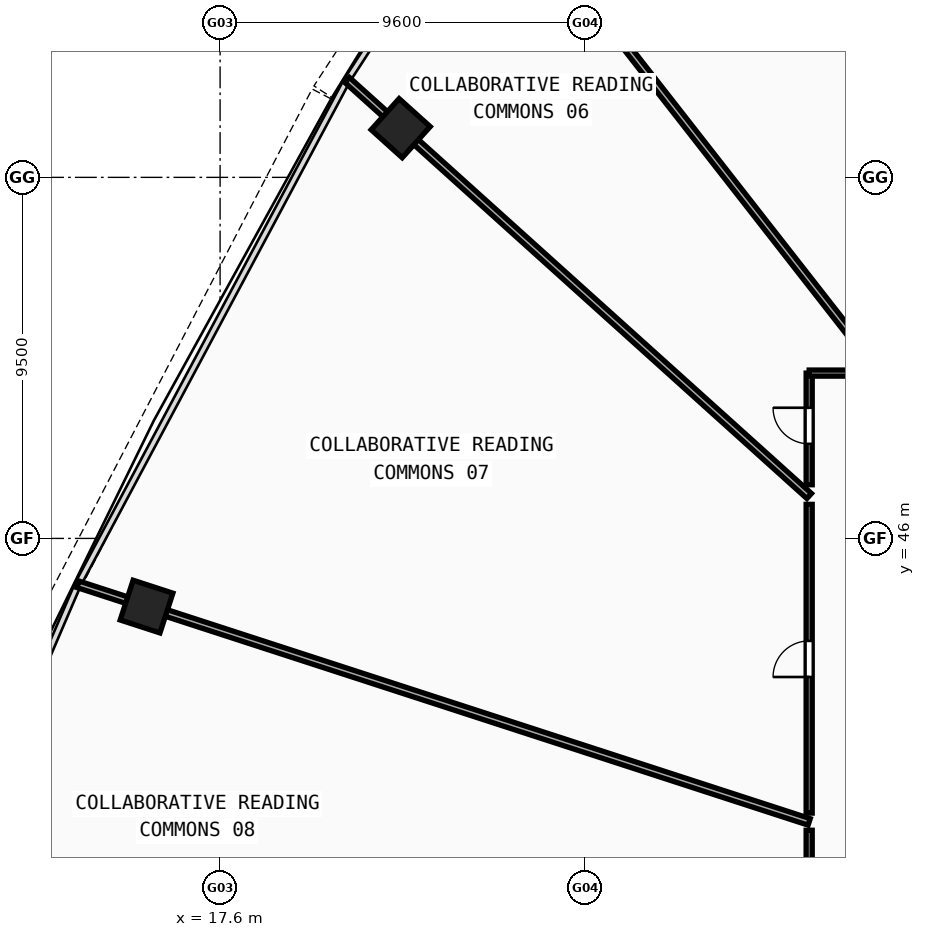
"""IFC4 building model, lengths in metres.
Left out: names, types, materials, properties, quantities, classifications, styles, units other than length and angle.
Written with IfcOpenShell. Run it as: python <this file> out.ifc"""

import sys

from ifc_helpers import new_model, si_unit, direction, frame, frame_2d, origin, origin_with_axes, origin_2d, place, context, subcontext, project, spatial, rectangle, hollow_rectangle, extrude, source, transform, mapped, element, fill, save


model = new_model("IFC4")
c1 = context("Model", 3, precision=1e-05, world=origin(), true_north=direction((0.0, 1.0)))
c2 = subcontext(c1, "Body", "Model", "MODEL_VIEW")
j1 = project(units=[si_unit("LENGTHUNIT", "METRE"), si_unit("PLANEANGLEUNIT", "RADIAN")], contexts=[c1])
p1 = place(None, origin())
s1 = spatial("IfcSite", under=j1, at=p1, CompositionType="ELEMENT")
p2 = place(p1, origin())
s2 = spatial("IfcBuilding", under=s1, at=p2, CompositionType="ELEMENT")
p3 = place(p2, frame((0.0, 0.0, 34.03)))
s3 = spatial("IfcBuildingStorey", under=s2, at=p3, CompositionType="ELEMENT", Elevation=34.03)
m1 = source(origin(), c2, "Body", "SweptSolid", [
    extrude(hollow_rectangle(XDim=1.1, YDim=1.1, WallThickness=0.045, at=origin_2d()), origin(), (0.0, 0.0, 1.0), 3.63),
])
for number, where, z_axis, x_axis in (
    (1, (22.351, 56.794, -0.26), (0.0, 0.0, 1.0), (-0.669, -0.743, 0.0)),
    (2, (15.665, 44.206, -0.26), (0.0, 0.0, 1.0), (-0.309, -0.951, 0.0)),
):
    element("IfcColumn", number, at=place(p3, frame(where, z_axis=z_axis, x_axis=x_axis)), inside=s3, PredefinedType="COLUMN", context=c2, shape_type="MappedRepresentation", body=[
        mapped(m1, transform((0.0, 0.0, 0.0), scale=1.0)),
    ])
p4 = place(p3, frame((40.587, 50.35, 0.0), z_axis=(0.0, 0.0, 1.0), x_axis=(-0.406741199867, 0.913543428815, 0.0)))
e3 = element("IfcWall", 3, at=p4, inside=s3, PredefinedType="PARTITIONING", context=c2, shape_type="SweptSolid", body=[
    extrude(rectangle(XDim=24.65, YDim=0.18, at=frame_2d((12.325, 0.0))), origin(), (0.0, 0.0, 1.0), 2.67),
])
p5 = place(p3, frame((34.992, 50.35, 0.0), z_axis=(0.0, 0.0, 1.0), x_axis=(-0.615670109541, 0.788004007742, 0.0)))
e4 = element("IfcWall", 4, at=p5, inside=s3, PredefinedType="PARTITIONING", context=c2, shape_type="SweptSolid", body=[
    extrude(rectangle(XDim=16.902, YDim=0.18, at=frame_2d((8.451, 0.0))), origin(), (0.0, 0.0, 1.0), 2.67),
])
p6 = place(p3, frame((33.1, 47.116, 0.0), z_axis=(0.0, 0.0, 1.0), x_axis=(-0.74314347906, 0.669132101704, 0.0)))
e5 = element("IfcWall", 5, at=p6, inside=s3, PredefinedType="PARTITIONING", context=c2, shape_type="SweptSolid", body=[
    extrude(rectangle(XDim=16.358, YDim=0.18, at=frame_2d((8.179, 0.0))), origin(), (0.0, 0.0, 1.0), 2.67),
])
p7 = place(p3, frame((33.1, 38.541, 0.0), z_axis=(0.0, 0.0, 1.0), x_axis=(-0.951056237035, 0.309017853848, 0.0)))
e6 = element("IfcWall", 6, at=p7, inside=s3, PredefinedType="PARTITIONING", context=c2, shape_type="SweptSolid", body=[
    extrude(rectangle(XDim=20.231, YDim=0.18, at=frame_2d((10.115, 0.0))), origin(), (0.0, 0.0, 1.0), 2.67),
])
p8 = place(p3, frame((33.1, 33.92, 0.0), z_axis=(0.0, 0.0, 1.0), x_axis=(0.0, 1.0, 0.0)))
e7 = element("IfcWall", 7, at=p8, inside=s3, PredefinedType="PARTITIONING", context=c2, shape_type="SweptSolid", body=[
    extrude(rectangle(XDim=4.402, YDim=0.16, at=frame_2d((2.201, 0.0))), origin(), (0.0, 0.0, 1.0), 3.37),
])
p9 = place(p8, frame((1.726, 0.0, 0.0)))
e8 = element("IfcOpeningElement", 8, at=p9, cuts=e7, PredefinedType="OPENING", context=c2, shape_type="SweptSolid", body=[
    extrude(rectangle(XDim=0.95, YDim=2.1, at=frame_2d((0.475, 1.05))), frame((0.0, 0.09, 0.0), z_axis=(0.0, -1.0, 0.0), x_axis=(1.0, 0.0, 0.0)), (0.0, 0.0, 1.0), 0.18),
])
p10 = place(p3, frame((33.1, 38.773, 0.0), z_axis=(0.0, 0.0, 1.0), x_axis=(0.0, 1.0, 0.0)))
e9 = element("IfcWall", 9, at=p10, inside=s3, PredefinedType="PARTITIONING", context=c2, shape_type="SweptSolid", body=[
    extrude(rectangle(XDim=8.124, YDim=0.16, at=frame_2d((4.062, 0.0))), origin(), (0.0, 0.0, 1.0), 2.67),
])
p11 = place(p10, frame((3.581, 0.0, 0.0)))
e10 = element("IfcOpeningElement", 10, at=p11, cuts=e9, PredefinedType="OPENING", context=c2, shape_type="SweptSolid", body=[
    extrude(rectangle(XDim=0.95, YDim=2.1, at=frame_2d((0.475, 1.05))), frame((0.0, 0.09, 0.0), z_axis=(0.0, -1.0, 0.0), x_axis=(1.0, 0.0, 0.0)), (0.0, 0.0, 1.0), 0.18),
])
p12 = place(p3, frame((33.1, 47.412, 0.0), z_axis=(0.0, 0.0, 1.0), x_axis=(0.0, 1.0, 0.0)))
e11 = element("IfcWall", 11, at=p12, inside=s3, PredefinedType="PARTITIONING", context=c2, shape_type="SweptSolid", body=[
    extrude(rectangle(XDim=2.938, YDim=0.16, at=frame_2d((1.469, 0.0))), origin(), (0.0, 0.0, 1.0), 3.37),
])
p13 = place(p12, frame((1.076, 0.0, 0.0)))
e12 = element("IfcOpeningElement", 12, at=p13, cuts=e11, PredefinedType="OPENING", context=c2, shape_type="SweptSolid", body=[
    extrude(rectangle(XDim=0.95, YDim=2.1, at=frame_2d((0.475, 1.05))), frame((0.0, 0.09, 0.0), z_axis=(0.0, -1.0, 0.0), x_axis=(1.0, 0.0, 0.0)), (0.0, 0.0, 1.0), 0.18),
])
p14 = place(p3, frame((33.1, 50.35, 0.0), z_axis=(0.0, 0.0, 1.0), x_axis=(1.0, 0.0, 0.0)))
e13 = element("IfcWall", 13, at=p14, inside=s3, PredefinedType="PARTITIONING", context=c2, shape_type="SweptSolid", body=[
    extrude(rectangle(XDim=1.612, YDim=0.16, at=frame_2d((0.806, 0.0))), origin(), (0.0, 0.0, 1.0), 3.37),
])
m2 = source(origin(), c2, "Body", "SweptSolid", [
    extrude(rectangle(XDim=0.95, YDim=2.1, at=frame_2d((0.475, 1.05))), frame((0.0, 0.025, 0.0), z_axis=(0.0, -1.0, 0.0), x_axis=(1.0, 0.0, 0.0)), (0.0, 0.0, 1.0), 0.05),
])
p15 = place(p13, origin_with_axes())
e14 = element("IfcDoor", 14, at=p15, inside=s3, OperationType="SINGLE_SWING_RIGHT", PredefinedType="DOOR", context=c2, shape_type="MappedRepresentation", body=[
    mapped(m2, transform((0.0, 0.0, 0.0), scale=1.0)),
])
fill(e12, e14)
p16 = place(p11, origin_with_axes())
e15 = element("IfcDoor", 15, at=p16, inside=s3, OperationType="SINGLE_SWING_LEFT", PredefinedType="DOOR", context=c2, shape_type="MappedRepresentation", body=[
    mapped(m2, transform((0.0, 0.0, 0.0), scale=1.0)),
])
fill(e10, e15)
save(model, sys.argv[1])
